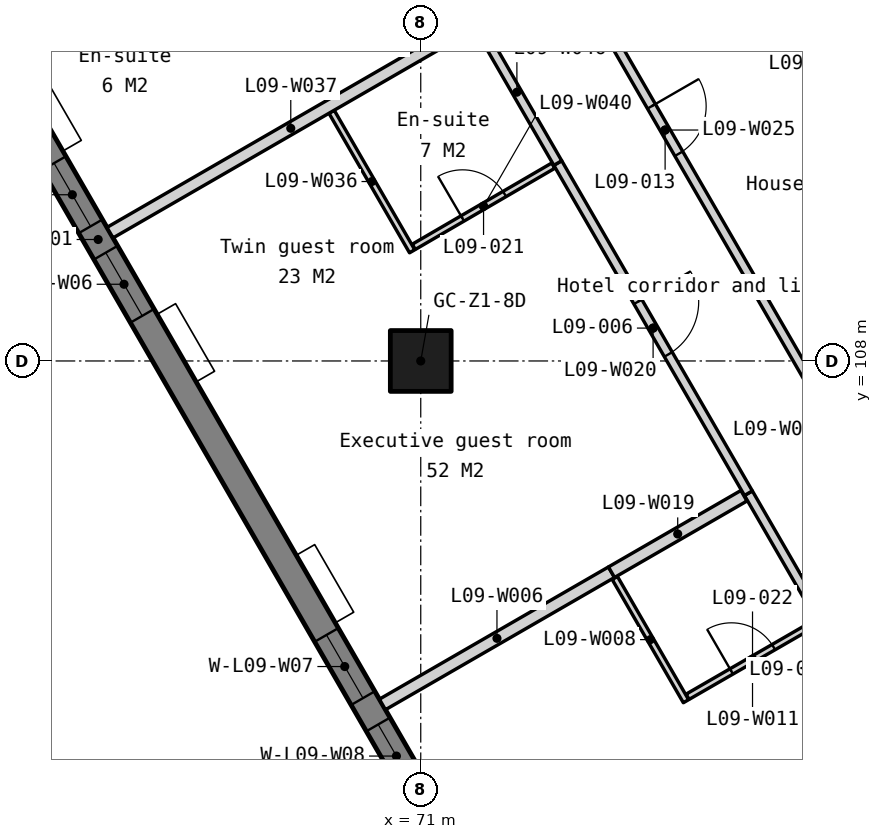
"""IFC4 building model, lengths in metres.
Left out: names, types, materials, properties, quantities, classifications, styles, units other than length and angle.
Written with IfcOpenShell. Run it as: python <this file> out.ifc"""

import sys

from ifc_helpers import new_model, si_unit, direction, frame, frame_2d, origin, origin_2d, place, context, subcontext, project, spatial, polyline, rectangle, outline, extrude, element, fill, save


model = new_model("IFC4")
c1 = context("Model", 3, precision=1e-05, world=origin(), true_north=direction((0.0, 1.0)))
c2 = subcontext(c1, "Body", "Model", "MODEL_VIEW")
j1 = project(units=[si_unit("LENGTHUNIT", "METRE"), si_unit("PLANEANGLEUNIT", "RADIAN")], contexts=[c1])
p1 = place(None, origin())
s1 = spatial("IfcSite", under=j1, at=p1, CompositionType="ELEMENT")
p2 = place(p1, origin())
s2 = spatial("IfcBuilding", under=s1, at=p2, CompositionType="ELEMENT")
p3 = place(p2, frame((0.0, 0.0, 45.5)))
s3 = spatial("IfcBuildingStorey", under=s2, at=p3, CompositionType="ELEMENT", Elevation=45.5)
p4 = place(p3, frame((71.0, 108.0, 0.0), z_axis=(0.0, 0.0, 1.0), x_axis=(1.0, 0.0, 0.0)))
e1 = element("IfcColumn", 1, at=p4, inside=s3, PredefinedType="COLUMN", context=c2, shape_type="SweptSolid", body=[
    extrude(rectangle(XDim=1.0, YDim=1.0, at=origin_2d()), origin(), (0.0, 0.0, 1.0), 3.5),
])
p5 = place(p3, frame((54.495, 129.397, -0.15), z_axis=(0.0, 0.0, 1.0), x_axis=(0.499999201451, -0.866025864826, 0.0)))
e2 = element("IfcWall", 2, at=p5, inside=s3, PredefinedType="SOLIDWALL", context=c2, shape_type="SweptSolid", body=[
    extrude(outline(polyline([(44.8, 0.0), (44.8, 3.5), (0.0, 3.5), (0.0, 0.0), (44.8, 0.0)])), frame((0.0, 0.225, 0.0), z_axis=(0.0, -1.0, 0.0), x_axis=(1.0, 0.0, 0.0)), (0.0, 0.0, 1.0), 0.45),
])
p6 = place(p5, frame((3.03, 0.0, 1.05)))
e3 = element("IfcOpeningElement", 3, at=p6, cuts=e2, PredefinedType="OPENING", context=c2, shape_type="SweptSolid", body=[
    extrude(rectangle(XDim=1.2, YDim=1.5, at=frame_2d((0.6, 0.75))), frame((0.0, 0.235, 0.0), z_axis=(0.0, -1.0, 0.0), x_axis=(1.0, 0.0, 0.0)), (0.0, 0.0, 1.0), 0.47),
])
p7 = place(p5, frame((4.73, 0.0, 1.05)))
e4 = element("IfcOpeningElement", 4, at=p7, cuts=e2, PredefinedType="OPENING", context=c2, shape_type="SweptSolid", body=[
    extrude(rectangle(XDim=1.2, YDim=1.5, at=frame_2d((0.6, 0.75))), frame((0.0, 0.235, 0.0), z_axis=(0.0, -1.0, 0.0), x_axis=(1.0, 0.0, 0.0)), (0.0, 0.0, 1.0), 0.47),
])
p8 = place(p5, frame((11.99, 0.0, 1.05)))
e5 = element("IfcOpeningElement", 5, at=p8, cuts=e2, PredefinedType="OPENING", context=c2, shape_type="SweptSolid", body=[
    extrude(rectangle(XDim=1.2, YDim=1.5, at=frame_2d((0.6, 0.75))), frame((0.0, 0.235, 0.0), z_axis=(0.0, -1.0, 0.0), x_axis=(1.0, 0.0, 0.0)), (0.0, 0.0, 1.0), 0.47),
])
p9 = place(p5, frame((13.69, 0.0, 1.05)))
e6 = element("IfcOpeningElement", 6, at=p9, cuts=e2, PredefinedType="OPENING", context=c2, shape_type="SweptSolid", body=[
    extrude(rectangle(XDim=1.2, YDim=1.5, at=frame_2d((0.6, 0.75))), frame((0.0, 0.235, 0.0), z_axis=(0.0, -1.0, 0.0), x_axis=(1.0, 0.0, 0.0)), (0.0, 0.0, 1.0), 0.47),
])
p10 = place(p5, frame((20.95, 0.0, 1.05)))
e7 = element("IfcOpeningElement", 7, at=p10, cuts=e2, PredefinedType="OPENING", context=c2, shape_type="SweptSolid", body=[
    extrude(rectangle(XDim=1.2, YDim=1.5, at=frame_2d((0.6, 0.75))), frame((0.0, 0.235, 0.0), z_axis=(0.0, -1.0, 0.0), x_axis=(1.0, 0.0, 0.0)), (0.0, 0.0, 1.0), 0.47),
])
p11 = place(p5, frame((22.65, 0.0, 1.05)))
e8 = element("IfcOpeningElement", 8, at=p11, cuts=e2, PredefinedType="OPENING", context=c2, shape_type="SweptSolid", body=[
    extrude(rectangle(XDim=1.2, YDim=1.5, at=frame_2d((0.6, 0.75))), frame((0.0, 0.235, 0.0), z_axis=(0.0, -1.0, 0.0), x_axis=(1.0, 0.0, 0.0)), (0.0, 0.0, 1.0), 0.47),
])
p12 = place(p5, frame((29.91, 0.0, 1.05)))
e9 = element("IfcOpeningElement", 9, at=p12, cuts=e2, PredefinedType="OPENING", context=c2, shape_type="SweptSolid", body=[
    extrude(rectangle(XDim=1.2, YDim=1.5, at=frame_2d((0.6, 0.75))), frame((0.0, 0.235, 0.0), z_axis=(0.0, -1.0, 0.0), x_axis=(1.0, 0.0, 0.0)), (0.0, 0.0, 1.0), 0.47),
])
p13 = place(p5, frame((31.61, 0.0, 1.05)))
e10 = element("IfcOpeningElement", 10, at=p13, cuts=e2, PredefinedType="OPENING", context=c2, shape_type="SweptSolid", body=[
    extrude(rectangle(XDim=1.2, YDim=1.5, at=frame_2d((0.6, 0.75))), frame((0.0, 0.235, 0.0), z_axis=(0.0, -1.0, 0.0), x_axis=(1.0, 0.0, 0.0)), (0.0, 0.0, 1.0), 0.47),
])
p14 = place(p5, frame((38.87, 0.0, 1.05)))
e11 = element("IfcOpeningElement", 11, at=p14, cuts=e2, PredefinedType="OPENING", context=c2, shape_type="SweptSolid", body=[
    extrude(rectangle(XDim=1.2, YDim=1.5, at=frame_2d((0.6, 0.75))), frame((0.0, 0.235, 0.0), z_axis=(0.0, -1.0, 0.0), x_axis=(1.0, 0.0, 0.0)), (0.0, 0.0, 1.0), 0.47),
])
p15 = place(p5, frame((40.57, 0.0, 1.05)))
e12 = element("IfcOpeningElement", 12, at=p15, cuts=e2, PredefinedType="OPENING", context=c2, shape_type="SweptSolid", body=[
    extrude(rectangle(XDim=1.2, YDim=1.5, at=frame_2d((0.6, 0.75))), frame((0.0, 0.235, 0.0), z_axis=(0.0, -1.0, 0.0), x_axis=(1.0, 0.0, 0.0)), (0.0, 0.0, 1.0), 0.47),
])
p16 = place(p3, frame((76.389, 105.826, 0.0), z_axis=(0.0, 0.0, 1.0), x_axis=(0.499980071345, -0.866036909293, 0.0)))
e13 = element("IfcWall", 13, at=p16, inside=s3, PredefinedType="PARTITIONING", context=c2, shape_type="SweptSolid", body=[
    extrude(rectangle(XDim=6.727, YDim=0.15, at=frame_2d((3.363, 0.0))), origin(), (0.0, 0.0, 1.0), 3.35),
])
p17 = place(p16, frame((2.914, 0.0, 0.0)))
e14 = element("IfcOpeningElement", 14, at=p17, cuts=e13, PredefinedType="OPENING", context=c2, shape_type="SweptSolid", body=[
    extrude(rectangle(XDim=0.9, YDim=2.1, at=frame_2d((0.45, 1.05))), frame((0.0, 0.085, 0.0), z_axis=(0.0, -1.0, 0.0), x_axis=(1.0, 0.0, 0.0)), (0.0, 0.0, 1.0), 0.17),
])
p18 = place(p3, frame((70.37, 102.351, 0.0), z_axis=(0.0, 0.0, 1.0), x_axis=(0.866027639635, 0.499996127374, 0.0)))
e15 = element("IfcWall", 15, at=p18, inside=s3, PredefinedType="PARTITIONING", context=c2, shape_type="SweptSolid", body=[
    extrude(rectangle(XDim=4.35, YDim=0.2, at=frame_2d((2.175, 0.0))), origin(), (0.0, 0.0, 1.0), 3.35),
])
p19 = place(p3, frame((74.192, 104.43, 0.0), z_axis=(0.0, 0.0, 1.0), x_axis=(0.499954256575, -0.866051812152, 0.0)))
e16 = element("IfcWall", 16, at=p19, inside=s3, PredefinedType="PARTITIONING", context=c2, shape_type="SweptSolid", body=[
    extrude(rectangle(XDim=2.34, YDim=0.1, at=frame_2d((1.17, 0.0))), origin(), (0.0, 0.0, 1.0), 3.35),
])
p20 = place(p3, frame((75.389, 102.477, 0.0), z_axis=(0.0, 0.0, 1.0), x_axis=(0.866040446274, 0.499973944738, 0.0)))
e17 = element("IfcWall", 17, at=p20, inside=s3, PredefinedType="PARTITIONING", context=c2, shape_type="SweptSolid", body=[
    extrude(rectangle(XDim=2.465, YDim=0.1, at=frame_2d((1.232, 0.0))), origin(), (0.0, 0.0, 1.0), 3.35),
])
p21 = place(p20, frame((0.833, 0.0, 0.0)))
e18 = element("IfcOpeningElement", 18, at=p21, cuts=e17, PredefinedType="OPENING", context=c2, shape_type="SweptSolid", body=[
    extrude(rectangle(XDim=0.8, YDim=2.1, at=frame_2d((0.4, 1.05))), frame((0.0, 0.06, 0.0), z_axis=(0.0, -1.0, 0.0), x_axis=(1.0, 0.0, 0.0)), (0.0, 0.0, 1.0), 0.12),
])
p22 = place(p3, frame((74.137, 104.526, 0.0), z_axis=(0.0, 0.0, 1.0), x_axis=(0.866006140796, 0.500033362991, 0.0)))
e19 = element("IfcWall", 19, at=p22, inside=s3, PredefinedType="PARTITIONING", context=c2, shape_type="SweptSolid", body=[
    extrude(rectangle(XDim=2.515, YDim=0.2, at=frame_2d((1.257, 0.0))), origin(), (0.0, 0.0, 1.0), 3.35),
])
p23 = place(p3, frame((73.254, 111.256, 0.0), z_axis=(0.0, 0.0, 1.0), x_axis=(0.5000044583, -0.866022829768, 0.0)))
e20 = element("IfcWall", 20, at=p23, inside=s3, PredefinedType="PARTITIONING", context=c2, shape_type="SweptSolid", body=[
    extrude(rectangle(XDim=6.27, YDim=0.15, at=frame_2d((3.135, 0.0))), origin(), (0.0, 0.0, 1.0), 3.35),
])
p24 = place(p23, frame((2.635, 0.0, 0.0)))
e21 = element("IfcOpeningElement", 21, at=p24, cuts=e20, PredefinedType="OPENING", context=c2, shape_type="SweptSolid", body=[
    extrude(rectangle(XDim=1.0, YDim=2.1, at=frame_2d((0.5, 1.05))), frame((0.0, 0.085, 0.0), z_axis=(0.0, -1.0, 0.0), x_axis=(1.0, 0.0, 0.0)), (0.0, 0.0, 1.0), 0.17),
])
p25 = place(p3, frame((71.583, 117.75, 0.0), z_axis=(0.0, 0.0, 1.0), x_axis=(0.500001770766, -0.86602438143, 0.0)))
e22 = element("IfcWall", 22, at=p25, inside=s3, PredefinedType="PARTITIONING", context=c2, shape_type="SweptSolid", body=[
    extrude(rectangle(XDim=13.745, YDim=0.15, at=frame_2d((6.873, 0.0))), origin(), (0.0, 0.0, 1.0), 3.35),
])
p26 = place(p25, frame((6.422, 0.0, 0.0)))
e23 = element("IfcOpeningElement", 23, at=p26, cuts=e22, PredefinedType="OPENING", context=c2, shape_type="SweptSolid", body=[
    extrude(rectangle(XDim=0.9, YDim=2.1, at=frame_2d((0.45, 1.05))), frame((0.0, 0.085, 0.0), z_axis=(0.0, -1.0, 0.0), x_axis=(1.0, 0.0, 0.0)), (0.0, 0.0, 1.0), 0.17),
])
p27 = place(p3, frame((69.534, 112.099, 0.0), z_axis=(0.0, 0.0, 1.0), x_axis=(0.499993606316, -0.866029095148, 0.0)))
e24 = element("IfcWall", 24, at=p27, inside=s3, PredefinedType="PARTITIONING", context=c2, shape_type="SweptSolid", body=[
    extrude(rectangle(XDim=2.65, YDim=0.1, at=frame_2d((1.325, 0.0))), origin(), (0.0, 0.0, 1.0), 3.35),
])
p28 = place(p3, frame((65.89, 110.11, 0.0), z_axis=(0.0, 0.0, 1.0), x_axis=(0.86603516302, 0.499983096127, 0.0)))
e25 = element("IfcWall", 25, at=p28, inside=s3, PredefinedType="PARTITIONING", context=c2, shape_type="SweptSolid", body=[
    extrude(rectangle(XDim=6.865, YDim=0.2, at=frame_2d((3.433, 0.0))), origin(), (0.0, 0.0, 1.0), 3.35),
])
p29 = place(p3, frame((70.885, 109.877, 0.0), z_axis=(0.0, 0.0, 1.0), x_axis=(0.864248761918, 0.503064685228, 0.0)))
e26 = element("IfcWall", 26, at=p29, inside=s3, PredefinedType="PARTITIONING", context=c2, shape_type="SweptSolid", body=[
    extrude(rectangle(XDim=2.655, YDim=0.1, at=frame_2d((1.328, 0.0))), origin(), (0.0, 0.0, 1.0), 3.35),
])
p30 = place(p29, frame((0.927, 0.0, 0.0)))
e27 = element("IfcOpeningElement", 27, at=p30, cuts=e26, PredefinedType="OPENING", context=c2, shape_type="SweptSolid", body=[
    extrude(rectangle(XDim=0.8, YDim=2.1, at=frame_2d((0.4, 1.05))), frame((0.0, 0.06, 0.0), z_axis=(0.0, -1.0, 0.0), x_axis=(1.0, 0.0, 0.0)), (0.0, 0.0, 1.0), 0.12),
])
p31 = place(p3, frame((71.909, 113.585, 0.0), z_axis=(0.0, 0.0, 1.0), x_axis=(0.499994808408, -0.866028401131, 0.0)))
e28 = element("IfcWall", 28, at=p31, inside=s3, PredefinedType="PARTITIONING", context=c2, shape_type="SweptSolid", body=[
    extrude(rectangle(XDim=2.69, YDim=0.15, at=frame_2d((1.345, 0.0))), origin(), (0.0, 0.0, 1.0), 3.35),
])
p32 = place(p10, origin())
e29 = element("IfcWindow", 29, at=p32, inside=s3, PartitioningType="SINGLE_PANEL", PredefinedType="WINDOW", context=c2, shape_type="SweptSolid", body=[
    extrude(rectangle(XDim=1.2, YDim=1.5, at=frame_2d((0.6, 0.75))), frame((0.0, 0.03, 0.0), z_axis=(0.0, -1.0, 0.0), x_axis=(1.0, 0.0, 0.0)), (0.0, 0.0, 1.0), 0.06),
])
fill(e7, e29)
p33 = place(p11, origin())
e30 = element("IfcWindow", 30, at=p33, inside=s3, PartitioningType="SINGLE_PANEL", PredefinedType="WINDOW", context=c2, shape_type="SweptSolid", body=[
    extrude(rectangle(XDim=1.2, YDim=1.5, at=frame_2d((0.6, 0.75))), frame((0.0, 0.03, 0.0), z_axis=(0.0, -1.0, 0.0), x_axis=(1.0, 0.0, 0.0)), (0.0, 0.0, 1.0), 0.06),
])
fill(e8, e30)
p34 = place(p12, origin())
e31 = element("IfcWindow", 31, at=p34, inside=s3, PartitioningType="SINGLE_PANEL", PredefinedType="WINDOW", context=c2, shape_type="SweptSolid", body=[
    extrude(rectangle(XDim=1.2, YDim=1.5, at=frame_2d((0.6, 0.75))), frame((0.0, 0.03, 0.0), z_axis=(0.0, -1.0, 0.0), x_axis=(1.0, 0.0, 0.0)), (0.0, 0.0, 1.0), 0.06),
])
fill(e9, e31)
p35 = place(p13, origin())
e32 = element("IfcWindow", 32, at=p35, inside=s3, PartitioningType="SINGLE_PANEL", PredefinedType="WINDOW", context=c2, shape_type="SweptSolid", body=[
    extrude(rectangle(XDim=1.2, YDim=1.5, at=frame_2d((0.6, 0.75))), frame((0.0, 0.03, 0.0), z_axis=(0.0, -1.0, 0.0), x_axis=(1.0, 0.0, 0.0)), (0.0, 0.0, 1.0), 0.06),
])
fill(e10, e32)
p36 = place(p24, origin())
e33 = element("IfcDoor", 33, at=p36, inside=s3, OperationType="SINGLE_SWING_LEFT", PredefinedType="DOOR", context=c2, shape_type="SweptSolid", body=[
    extrude(rectangle(XDim=1.0, YDim=2.1, at=frame_2d((0.5, 1.05))), frame((0.0, 0.025, 0.0), z_axis=(0.0, -1.0, 0.0), x_axis=(1.0, 0.0, 0.0)), (0.0, 0.0, 1.0), 0.05),
])
fill(e21, e33)
p37 = place(p26, origin())
e34 = element("IfcDoor", 34, at=p37, inside=s3, OperationType="SINGLE_SWING_LEFT", PredefinedType="DOOR", context=c2, shape_type="SweptSolid", body=[
    extrude(rectangle(XDim=0.9, YDim=2.1, at=frame_2d((0.45, 1.05))), frame((0.0, 0.025, 0.0), z_axis=(0.0, -1.0, 0.0), x_axis=(1.0, 0.0, 0.0)), (0.0, 0.0, 1.0), 0.05),
])
fill(e23, e34)
p38 = place(p30, origin())
e35 = element("IfcDoor", 35, at=p38, inside=s3, OperationType="SINGLE_SWING_LEFT", PredefinedType="DOOR", context=c2, shape_type="SweptSolid", body=[
    extrude(rectangle(XDim=0.8, YDim=2.1, at=frame_2d((0.4, 1.05))), frame((0.0, 0.025, 0.0), z_axis=(0.0, -1.0, 0.0), x_axis=(1.0, 0.0, 0.0)), (0.0, 0.0, 1.0), 0.05),
])
fill(e27, e35)
p39 = place(p21, origin())
e36 = element("IfcDoor", 36, at=p39, inside=s3, OperationType="SINGLE_SWING_LEFT", PredefinedType="DOOR", context=c2, shape_type="SweptSolid", body=[
    extrude(rectangle(XDim=0.8, YDim=2.1, at=frame_2d((0.4, 1.05))), frame((0.0, 0.025, 0.0), z_axis=(0.0, -1.0, 0.0), x_axis=(1.0, 0.0, 0.0)), (0.0, 0.0, 1.0), 0.05),
])
fill(e18, e36)
save(model, sys.argv[1])
